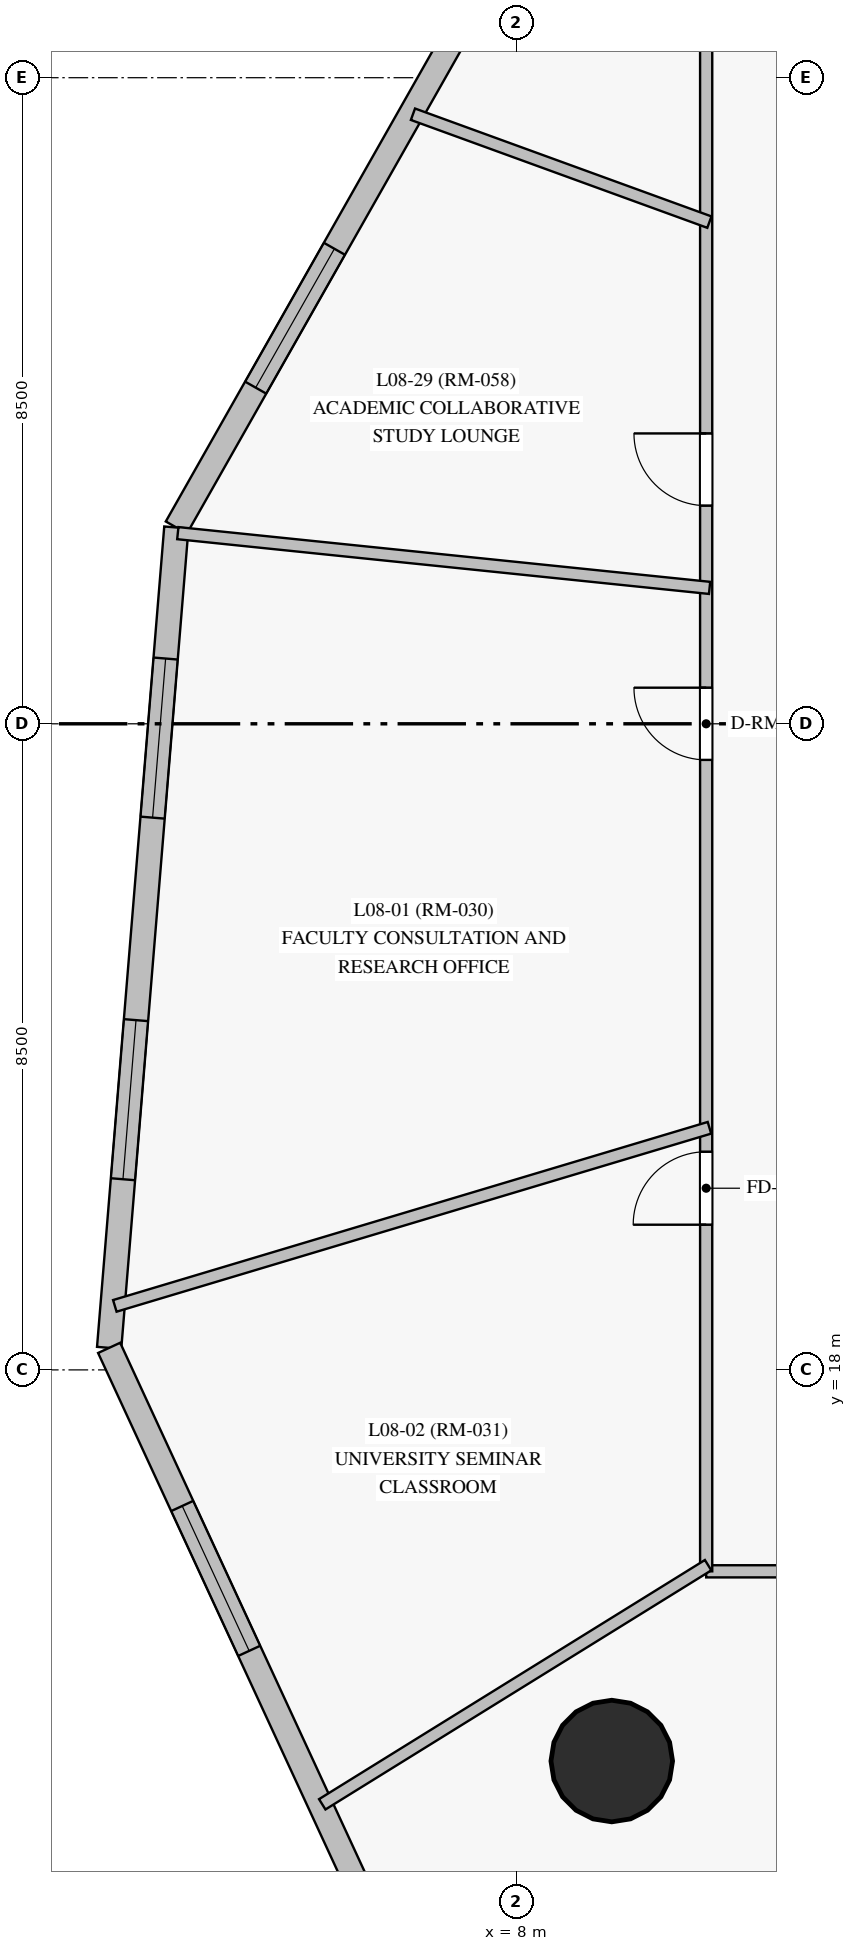
"""IFC4 building model, lengths in metres.
Left out: names, types, materials, properties, quantities, classifications, styles, units other than length and angle.
Written with IfcOpenShell. Run it as: python <this file> out.ifc"""

import sys

from ifc_helpers import new_model, si_unit, direction, frame, frame_2d, origin, origin_with_axes, origin_2d, place, context, subcontext, project, spatial, rectangle, circle, extrude, source, transform, mapped, element, fill, save


model = new_model("IFC4")
c1 = context("Model", 3, precision=1e-05, world=origin(), true_north=direction((0.0, 1.0)))
c2 = subcontext(c1, "Body", "Model", "MODEL_VIEW")
j1 = project(units=[si_unit("LENGTHUNIT", "METRE"), si_unit("PLANEANGLEUNIT", "RADIAN")], contexts=[c1])
p1 = place(None, origin())
s1 = spatial("IfcSite", under=j1, at=p1, CompositionType="ELEMENT")
p2 = place(p1, origin())
s2 = spatial("IfcBuilding", under=s1, at=p2, CompositionType="ELEMENT")
p3 = place(p2, frame((0.0, 0.0, 33.7)))
s3 = spatial("IfcBuildingStorey", under=s2, at=p3, CompositionType="ELEMENT", Elevation=33.7)
m1 = source(origin_with_axes(), c2, "Body", "SweptSolid", [
    extrude(circle(Radius=0.8, at=origin_2d()), origin(), (0.0, 0.0, 1.0), 3.6),
])
p4 = place(p3, frame((9.258, 12.854, 0.0), z_axis=(0.0, 0.0, 1.0), x_axis=(1.0, 0.0, 0.0)))
e1 = element("IfcColumn", 1, at=p4, inside=s3, PredefinedType="COLUMN", context=c2, shape_type="MappedRepresentation", body=[
    mapped(m1, transform((0.0, 0.0, 0.0), scale=1.0)),
])
p5 = place(p3, frame((11.292, 42.771, 0.0), z_axis=(0.0, 0.0, 1.0), x_axis=(-0.493295954428, -0.869861541479, 0.0)))
e2 = element("IfcWall", 2, at=p5, inside=s3, PredefinedType="SOLIDWALL", context=c2, shape_type="SweptSolid", body=[
    extrude(rectangle(XDim=15.736, YDim=0.32, at=frame_2d((7.868, 0.0))), origin(), (0.0, 0.0, 1.0), 3.35),
])
p6 = place(p5, frame((1.521, 0.0, 0.85)))
e3 = element("IfcOpeningElement", 3, at=p6, cuts=e2, PredefinedType="OPENING", context=c2, shape_type="SweptSolid", body=[
    extrude(rectangle(XDim=2.1, YDim=1.95, at=frame_2d((1.05, 0.975))), frame((0.0, 0.17, 0.0), z_axis=(0.0, -1.0, 0.0), x_axis=(1.0, 0.0, 0.0)), (0.0, 0.0, 1.0), 0.34),
])
p7 = place(p5, frame((5.905, 0.0, 0.85)))
e4 = element("IfcOpeningElement", 4, at=p7, cuts=e2, PredefinedType="OPENING", context=c2, shape_type="SweptSolid", body=[
    extrude(rectangle(XDim=2.1, YDim=1.95, at=frame_2d((1.05, 0.975))), frame((0.0, 0.17, 0.0), z_axis=(0.0, -1.0, 0.0), x_axis=(1.0, 0.0, 0.0)), (0.0, 0.0, 1.0), 0.34),
])
p8 = place(p5, frame((11.521, 0.0, 0.85)))
e5 = element("IfcOpeningElement", 5, at=p8, cuts=e2, PredefinedType="OPENING", context=c2, shape_type="SweptSolid", body=[
    extrude(rectangle(XDim=2.1, YDim=1.95, at=frame_2d((1.05, 0.975))), frame((0.0, 0.17, 0.0), z_axis=(0.0, -1.0, 0.0), x_axis=(1.0, 0.0, 0.0)), (0.0, 0.0, 1.0), 0.34),
])
p9 = place(p3, frame((3.53, 29.083, 0.0), z_axis=(0.0, 0.0, 1.0), x_axis=(-0.0816572616, -0.996660469582, 0.0)))
e6 = element("IfcWall", 6, at=p9, inside=s3, PredefinedType="SOLIDWALL", context=c2, shape_type="SweptSolid", body=[
    extrude(rectangle(XDim=10.829, YDim=0.32, at=frame_2d((5.415, 0.0))), origin(), (0.0, 0.0, 1.0), 3.35),
])
p10 = place(p9, frame((1.73, 0.0, 0.85)))
e7 = element("IfcOpeningElement", 7, at=p10, cuts=e6, PredefinedType="OPENING", context=c2, shape_type="SweptSolid", body=[
    extrude(rectangle(XDim=2.1, YDim=1.95, at=frame_2d((1.05, 0.975))), frame((0.0, 0.17, 0.0), z_axis=(0.0, -1.0, 0.0), x_axis=(1.0, 0.0, 0.0)), (0.0, 0.0, 1.0), 0.34),
])
p11 = place(p9, frame((6.503, 0.0, 0.85)))
e8 = element("IfcOpeningElement", 8, at=p11, cuts=e6, PredefinedType="OPENING", context=c2, shape_type="SweptSolid", body=[
    extrude(rectangle(XDim=2.1, YDim=1.95, at=frame_2d((1.05, 0.975))), frame((0.0, 0.17, 0.0), z_axis=(0.0, -1.0, 0.0), x_axis=(1.0, 0.0, 0.0)), (0.0, 0.0, 1.0), 0.34),
])
p12 = place(p3, frame((2.646, 18.29, 0.0), z_axis=(0.0, 0.0, 1.0), x_axis=(0.419547504899, -0.907733381083, 0.0)))
e9 = element("IfcWall", 9, at=p12, inside=s3, PredefinedType="SOLIDWALL", context=c2, shape_type="SweptSolid", body=[
    extrude(rectangle(XDim=13.445, YDim=0.32, at=frame_2d((6.723, 0.0))), origin(), (0.0, 0.0, 1.0), 3.35),
])
p13 = place(p12, frame((2.292, 0.0, 0.85)))
e10 = element("IfcOpeningElement", 10, at=p13, cuts=e9, PredefinedType="OPENING", context=c2, shape_type="SweptSolid", body=[
    extrude(rectangle(XDim=2.1, YDim=1.95, at=frame_2d((1.05, 0.975))), frame((0.0, 0.17, 0.0), z_axis=(0.0, -1.0, 0.0), x_axis=(1.0, 0.0, 0.0)), (0.0, 0.0, 1.0), 0.34),
])
p14 = place(p12, frame((8.879, 0.0, 0.85)))
e11 = element("IfcOpeningElement", 11, at=p14, cuts=e9, PredefinedType="OPENING", context=c2, shape_type="SweptSolid", body=[
    extrude(rectangle(XDim=2.1, YDim=1.95, at=frame_2d((1.05, 0.975))), frame((0.0, 0.17, 0.0), z_axis=(0.0, -1.0, 0.0), x_axis=(1.0, 0.0, 0.0)), (0.0, 0.0, 1.0), 0.34),
])
p15 = place(p3, frame((40.25, 15.35, 0.0), z_axis=(0.0, 0.0, 1.0), x_axis=(-1.0, 0.0, 0.0)))
e12 = element("IfcWall", 12, at=p15, inside=s3, PredefinedType="PARTITIONING", context=c2, shape_type="SweptSolid", body=[
    extrude(rectangle(XDim=29.75, YDim=0.16, at=frame_2d((14.875, 0.0))), origin(), (0.0, 0.0, 1.0), 2.7),
])
p16 = place(p15, frame((25.925, 0.0, 0.0)))
e13 = element("IfcOpeningElement", 13, at=p16, cuts=e12, PredefinedType="OPENING", context=c2, shape_type="SweptSolid", body=[
    extrude(rectangle(XDim=0.95, YDim=2.15, at=frame_2d((0.475, 1.075))), frame((0.0, 0.09, 0.0), z_axis=(0.0, -1.0, 0.0), x_axis=(1.0, 0.0, 0.0)), (0.0, 0.0, 1.0), 0.18),
])
p17 = place(p15, frame((21.748, 0.0, 0.0)))
e14 = element("IfcOpeningElement", 14, at=p17, cuts=e12, PredefinedType="OPENING", context=c2, shape_type="SweptSolid", body=[
    extrude(rectangle(XDim=0.95, YDim=2.15, at=frame_2d((0.475, 1.075))), frame((0.0, 0.09, 0.0), z_axis=(0.0, -1.0, 0.0), x_axis=(1.0, 0.0, 0.0)), (0.0, 0.0, 1.0), 0.18),
])
p18 = place(p15, frame((18.423, 0.0, 0.0)))
e15 = element("IfcOpeningElement", 15, at=p18, cuts=e12, PredefinedType="OPENING", context=c2, shape_type="SweptSolid", body=[
    extrude(rectangle(XDim=0.95, YDim=2.15, at=frame_2d((0.475, 1.075))), frame((0.0, 0.09, 0.0), z_axis=(0.0, -1.0, 0.0), x_axis=(1.0, 0.0, 0.0)), (0.0, 0.0, 1.0), 0.18),
])
p19 = place(p15, frame((15.67, 0.0, 0.0)))
e16 = element("IfcOpeningElement", 16, at=p19, cuts=e12, PredefinedType="OPENING", context=c2, shape_type="SweptSolid", body=[
    extrude(rectangle(XDim=0.95, YDim=2.15, at=frame_2d((0.475, 1.075))), frame((0.0, 0.09, 0.0), z_axis=(0.0, -1.0, 0.0), x_axis=(1.0, 0.0, 0.0)), (0.0, 0.0, 1.0), 0.18),
])
p20 = place(p15, frame((13.96, 0.0, 0.0)))
e17 = element("IfcOpeningElement", 17, at=p20, cuts=e12, PredefinedType="OPENING", context=c2, shape_type="SweptSolid", body=[
    extrude(rectangle(XDim=0.95, YDim=2.15, at=frame_2d((0.475, 1.075))), frame((0.0, 0.09, 0.0), z_axis=(0.0, -1.0, 0.0), x_axis=(1.0, 0.0, 0.0)), (0.0, 0.0, 1.0), 0.18),
])
p21 = place(p15, frame((9.938, 0.0, 0.0)))
e18 = element("IfcOpeningElement", 18, at=p21, cuts=e12, PredefinedType="OPENING", context=c2, shape_type="SweptSolid", body=[
    extrude(rectangle(XDim=0.95, YDim=2.15, at=frame_2d((0.475, 1.075))), frame((0.0, 0.09, 0.0), z_axis=(0.0, -1.0, 0.0), x_axis=(1.0, 0.0, 0.0)), (0.0, 0.0, 1.0), 0.18),
])
p22 = place(p15, frame((7.103, 0.0, 0.0)))
e19 = element("IfcOpeningElement", 19, at=p22, cuts=e12, PredefinedType="OPENING", context=c2, shape_type="SweptSolid", body=[
    extrude(rectangle(XDim=0.95, YDim=2.15, at=frame_2d((0.475, 1.075))), frame((0.0, 0.09, 0.0), z_axis=(0.0, -1.0, 0.0), x_axis=(1.0, 0.0, 0.0)), (0.0, 0.0, 1.0), 0.18),
])
p23 = place(p3, frame((10.5, 15.35, 0.0), z_axis=(0.0, 0.0, 1.0), x_axis=(0.0, 1.0, 0.0)))
e20 = element("IfcWall", 20, at=p23, inside=s3, PredefinedType="PARTITIONING", context=c2, shape_type="SweptSolid", body=[
    extrude(rectangle(XDim=22.3, YDim=0.16, at=frame_2d((11.15, 0.0))), origin(), (0.0, 0.0, 1.0), 2.75),
])
p24 = place(p23, frame((10.675, 0.0, 0.0)))
e21 = element("IfcOpeningElement", 21, at=p24, cuts=e20, PredefinedType="OPENING", context=c2, shape_type="SweptSolid", body=[
    extrude(rectangle(XDim=0.95, YDim=2.15, at=frame_2d((0.475, 1.075))), frame((0.0, 0.09, 0.0), z_axis=(0.0, -1.0, 0.0), x_axis=(1.0, 0.0, 0.0)), (0.0, 0.0, 1.0), 0.18),
])
p25 = place(p23, frame((4.56, 0.0, 0.0)))
e22 = element("IfcOpeningElement", 22, at=p25, cuts=e20, PredefinedType="OPENING", context=c2, shape_type="SweptSolid", body=[
    extrude(rectangle(XDim=0.96, YDim=2.15, at=frame_2d((0.48, 1.075))), frame((0.0, 0.09, 0.0), z_axis=(0.0, -1.0, 0.0), x_axis=(1.0, 0.0, 0.0)), (0.0, 0.0, 1.0), 0.18),
])
p26 = place(p23, frame((14.02, 0.0, 0.0)))
e23 = element("IfcOpeningElement", 23, at=p26, cuts=e20, PredefinedType="OPENING", context=c2, shape_type="SweptSolid", body=[
    extrude(rectangle(XDim=0.95, YDim=2.15, at=frame_2d((0.475, 1.075))), frame((0.0, 0.09, 0.0), z_axis=(0.0, -1.0, 0.0), x_axis=(1.0, 0.0, 0.0)), (0.0, 0.0, 1.0), 0.18),
])
p27 = place(p3, frame((17.307, 15.371, 0.0), z_axis=(0.0, 0.0, 1.0), x_axis=(-0.706450948612, -0.707762006048, 0.0)))
e24 = element("IfcWall", 24, at=p27, inside=s3, PredefinedType="PARTITIONING", context=c2, shape_type="SweptSolid", body=[
    extrude(rectangle(XDim=12.849, YDim=0.16, at=frame_2d((6.424, 0.0))), origin(), (0.0, 0.0, 1.0), 3.35),
])
p28 = place(p3, frame((10.543, 21.185, 0.0), z_axis=(0.0, 0.0, 1.0), x_axis=(-0.957965231721, -0.286884323053, 0.0)))
e25 = element("IfcWall", 25, at=p28, inside=s3, PredefinedType="PARTITIONING", context=c2, shape_type="SweptSolid", body=[
    extrude(rectangle(XDim=8.166, YDim=0.16, at=frame_2d((4.083, 0.0))), origin(), (0.0, 0.0, 1.0), 3.35),
])
p29 = place(p3, frame((3.549, 29.008, 0.0), z_axis=(0.0, 0.0, 1.0), x_axis=(0.994742882888, -0.102404086562, 0.0)))
e26 = element("IfcWall", 26, at=p29, inside=s3, PredefinedType="PARTITIONING", context=c2, shape_type="SweptSolid", body=[
    extrude(rectangle(XDim=7.033, YDim=0.16, at=frame_2d((3.517, 0.0))), origin(), (0.0, 0.0, 1.0), 3.35),
])
p30 = place(p3, frame((10.525, 15.431, 0.0), z_axis=(0.0, 0.0, 1.0), x_axis=(-0.849994952972, -0.526790831281, 0.0)))
e27 = element("IfcWall", 27, at=p30, inside=s3, PredefinedType="PARTITIONING", context=c2, shape_type="SweptSolid", body=[
    extrude(rectangle(XDim=5.972, YDim=0.16, at=frame_2d((2.986, 0.0))), origin(), (0.0, 0.0, 1.0), 3.35),
])
p31 = place(p3, frame((10.542, 33.1, 0.0), z_axis=(0.0, 0.0, 1.0), x_axis=(-0.939705790412, 0.341983957908, 0.0)))
e28 = element("IfcWall", 28, at=p31, inside=s3, PredefinedType="PARTITIONING", context=c2, shape_type="SweptSolid", body=[
    extrude(rectangle(XDim=4.15, YDim=0.16, at=frame_2d((2.075, 0.0))), origin(), (0.0, 0.0, 1.0), 3.35),
])
m2 = source(origin_with_axes(), c2, "Body", "SweptSolid", [
    extrude(rectangle(XDim=2.1, YDim=1.95, at=frame_2d((1.05, 0.975))), frame((0.0, 0.03, 0.0), z_axis=(0.0, -1.0, 0.0), x_axis=(1.0, 0.0, 0.0)), (0.0, 0.0, 1.0), 0.06),
])
p32 = place(p8, origin())
e29 = element("IfcWindow", 29, at=p32, inside=s3, PartitioningType="SINGLE_PANEL", PredefinedType="WINDOW", context=c2, shape_type="MappedRepresentation", body=[
    mapped(m2, transform((0.0, 0.0, 0.0), scale=1.0)),
])
fill(e5, e29)
p33 = place(p10, origin())
e30 = element("IfcWindow", 30, at=p33, inside=s3, PartitioningType="SINGLE_PANEL", PredefinedType="WINDOW", context=c2, shape_type="MappedRepresentation", body=[
    mapped(m2, transform((0.0, 0.0, 0.0), scale=1.0)),
])
fill(e7, e30)
p34 = place(p11, origin())
e31 = element("IfcWindow", 31, at=p34, inside=s3, PartitioningType="SINGLE_PANEL", PredefinedType="WINDOW", context=c2, shape_type="MappedRepresentation", body=[
    mapped(m2, transform((0.0, 0.0, 0.0), scale=1.0)),
])
fill(e8, e31)
p35 = place(p13, origin())
e32 = element("IfcWindow", 32, at=p35, inside=s3, PartitioningType="SINGLE_PANEL", PredefinedType="WINDOW", context=c2, shape_type="MappedRepresentation", body=[
    mapped(m2, transform((0.0, 0.0, 0.0), scale=1.0)),
])
fill(e10, e32)
m3 = source(origin_with_axes(), c2, "Body", "SweptSolid", [
    extrude(rectangle(XDim=0.95, YDim=2.15, at=frame_2d((0.475, 1.075))), frame((0.0, 0.025, 0.0), z_axis=(0.0, -1.0, 0.0), x_axis=(1.0, 0.0, 0.0)), (0.0, 0.0, 1.0), 0.05),
])
p36 = place(p24, origin())
e33 = element("IfcDoor", 33, at=p36, inside=s3, OperationType="SINGLE_SWING_RIGHT", PredefinedType="DOOR", context=c2, shape_type="MappedRepresentation", body=[
    mapped(m3, transform((0.0, 0.0, 0.0), scale=1.0)),
])
fill(e21, e33)
m4 = source(origin_with_axes(), c2, "Body", "SweptSolid", [
    extrude(rectangle(XDim=0.96, YDim=2.15, at=frame_2d((0.48, 1.075))), frame((0.0, 0.025, 0.0), z_axis=(0.0, -1.0, 0.0), x_axis=(1.0, 0.0, 0.0)), (0.0, 0.0, 1.0), 0.05),
])
p37 = place(p25, origin())
e34 = element("IfcDoor", 34, at=p37, inside=s3, OperationType="SINGLE_SWING_LEFT", PredefinedType="DOOR", context=c2, shape_type="MappedRepresentation", body=[
    mapped(m4, transform((0.0, 0.0, 0.0), scale=1.0)),
])
fill(e22, e34)
p38 = place(p26, origin())
e35 = element("IfcDoor", 35, at=p38, inside=s3, OperationType="SINGLE_SWING_RIGHT", PredefinedType="DOOR", context=c2, shape_type="MappedRepresentation", body=[
    mapped(m3, transform((0.0, 0.0, 0.0), scale=1.0)),
])
fill(e23, e35)
save(model, sys.argv[1])
